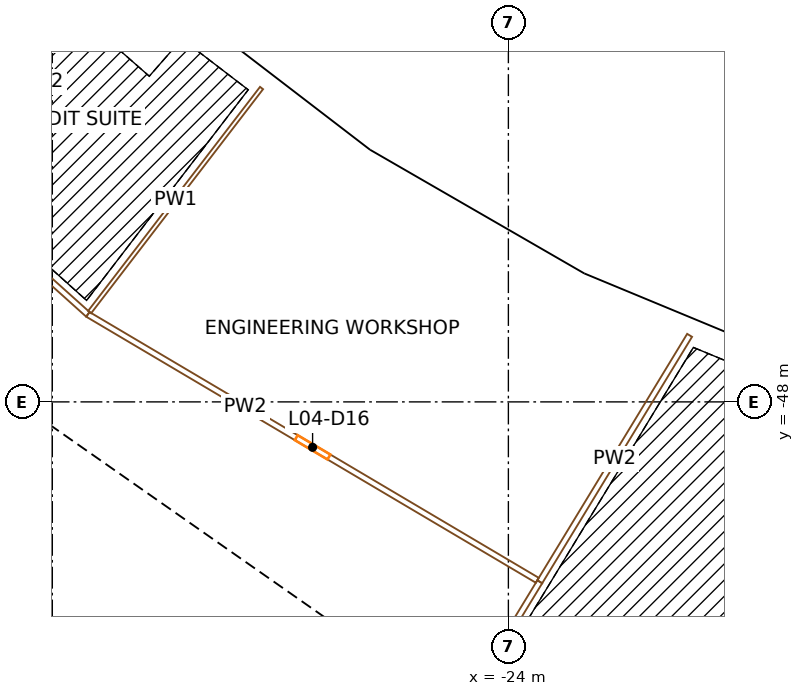
"""IFC4 building model, lengths in metres.
Left out: names, types, materials, properties, quantities, classifications, styles, units other than length and angle.
Written with IfcOpenShell. Run it as: python <this file> out.ifc"""

import sys

from ifc_helpers import new_model, si_unit, direction, frame, frame_2d, origin, origin_2d, place, context, subcontext, project, spatial, rectangle, extrude, element, fill, save


model = new_model("IFC4")
c1 = context("Model", 3, precision=1e-05, world=origin(), true_north=direction((0.0, 1.0)))
c2 = subcontext(c1, "Body", "Model", "MODEL_VIEW")
j1 = project(units=[si_unit("LENGTHUNIT", "METRE"), si_unit("PLANEANGLEUNIT", "RADIAN")], contexts=[c1])
p1 = place(None, origin())
s1 = spatial("IfcSite", under=j1, at=p1, CompositionType="ELEMENT")
p2 = place(p1, origin())
s2 = spatial("IfcBuilding", under=s1, at=p2, CompositionType="ELEMENT")
p3 = place(p2, frame((0.0, 0.0, 31.5)))
s3 = spatial("IfcBuildingStorey", under=s2, at=p3, CompositionType="ELEMENT", Elevation=31.5)
for number, where, z_axis, x_axis in (
    (1, (-33.462, -38.156, 0.0), (0.0, 0.0, 1.0), (0.752, -0.659, 0.0)),
    (2, (-28.195, -42.197, 0.0), (0.0, 0.0, 1.0), (0.831, -0.556, 0.0)),
):
    element("IfcColumn", number, at=place(p3, frame(where, z_axis=z_axis, x_axis=x_axis)), inside=s3, PredefinedType="COLUMN", context=c2, shape_type="SweptSolid", body=[
        extrude(rectangle(XDim=1.1, YDim=1.3, at=origin_2d()), origin(), (0.0, 0.0, 1.0), 4.5),
    ])
p4 = place(p3, frame((-32.362, -48.433, 0.0), z_axis=(0.0, 0.0, 1.0), x_axis=(0.831469612303, -0.55557023302, 0.0)))
e3 = element("IfcColumn", 3, at=p4, inside=s3, PredefinedType="COLUMN", context=c2, shape_type="SweptSolid", body=[
    extrude(rectangle(XDim=1.4, YDim=1.8, at=origin_2d()), origin(), (0.0, 0.0, 1.0), 4.5),
])
p5 = place(p3, frame((-22.446, -45.516, 0.0), z_axis=(0.0, 0.0, 1.0), x_axis=(0.896872741533, -0.442288690219, 0.0)))
e4 = element("IfcColumn", 4, at=p5, inside=s3, PredefinedType="COLUMN", context=c2, shape_type="SweptSolid", body=[
    extrude(rectangle(XDim=1.1, YDim=1.3, at=origin_2d()), origin(), (0.0, 0.0, 1.0), 4.5),
])
p6 = place(p3, frame((-25.763, -52.243, 0.0), z_axis=(0.0, 0.0, 1.0), x_axis=(0.896872741533, -0.442288690219, 0.0)))
e5 = element("IfcColumn", 5, at=p6, inside=s3, PredefinedType="COLUMN", context=c2, shape_type="SweptSolid", body=[
    extrude(rectangle(XDim=1.4, YDim=1.8, at=origin_2d()), origin(), (0.0, 0.0, 1.0), 4.5),
])
p7 = place(p3, frame((-28.854, -54.324, 0.0), z_axis=(0.0, 0.0, 1.0), x_axis=(-0.819145767589, 0.573585400304, 0.0)))
e6 = element("IfcWall", 6, at=p7, inside=s3, PredefinedType="SHEAR", context=c2, shape_type="SweptSolid", body=[
    extrude(rectangle(XDim=15.045, YDim=0.9, at=frame_2d((7.523, 0.0))), origin(), (0.0, 0.0, 1.0), 4.1),
])
p8 = place(p7, frame((1.05, 0.0, 0.0)))
e7 = element("IfcOpeningElement", 7, at=p8, cuts=e6, PredefinedType="OPENING", context=c2, shape_type="SweptSolid", body=[
    extrude(rectangle(XDim=0.9, YDim=2.1, at=frame_2d((0.45, 1.05))), frame((0.0, 0.46, 0.0), z_axis=(0.0, -1.0, 0.0), x_axis=(1.0, 0.0, 0.0)), (0.0, 0.0, 1.0), 0.92),
])
p9 = place(p7, frame((3.775, 0.0, 0.0)))
e8 = element("IfcOpeningElement", 8, at=p9, cuts=e6, PredefinedType="OPENING", context=c2, shape_type="SweptSolid", body=[
    extrude(rectangle(XDim=1.0, YDim=2.1, at=frame_2d((0.5, 1.05))), frame((0.0, 0.46, 0.0), z_axis=(0.0, -1.0, 0.0), x_axis=(1.0, 0.0, 0.0)), (0.0, 0.0, 1.0), 0.92),
])
p10 = place(p7, frame((6.275, 0.0, 0.0)))
e9 = element("IfcOpeningElement", 9, at=p10, cuts=e6, PredefinedType="OPENING", context=c2, shape_type="SweptSolid", body=[
    extrude(rectangle(XDim=1.0, YDim=2.1, at=frame_2d((0.5, 1.05))), frame((0.0, 0.46, 0.0), z_axis=(0.0, -1.0, 0.0), x_axis=(1.0, 0.0, 0.0)), (0.0, 0.0, 1.0), 0.92),
])
p11 = place(p7, frame((13.495, 0.0, 0.0)))
e10 = element("IfcOpeningElement", 10, at=p11, cuts=e6, PredefinedType="OPENING", context=c2, shape_type="SweptSolid", body=[
    extrude(rectangle(XDim=1.1, YDim=2.1, at=frame_2d((0.55, 1.05))), frame((0.0, 0.46, 0.0), z_axis=(0.0, -1.0, 0.0), x_axis=(1.0, 0.0, 0.0)), (0.0, 0.0, 1.0), 0.92),
])
p12 = place(p3, frame((-43.204, -60.696, 0.0), z_axis=(0.0, 0.0, 1.0), x_axis=(0.573571992966, 0.819155155563, 0.0)))
e11 = element("IfcWall", 11, at=p12, inside=s3, PredefinedType="SOLIDWALL", context=c2, shape_type="SweptSolid", body=[
    extrude(rectangle(XDim=13.0, YDim=0.3, at=frame_2d((6.5, 0.0))), origin(), (0.0, 0.0, 1.0), 4.1),
])
p13 = place(p3, frame((-30.461, -56.618, 0.0), z_axis=(0.0, 0.0, 1.0), x_axis=(-0.819142461705, 0.573590121456, 0.0)))
e12 = element("IfcWall", 12, at=p13, inside=s3, PredefinedType="SOLIDWALL", context=c2, shape_type="SweptSolid", body=[
    extrude(rectangle(XDim=7.95, YDim=0.3, at=frame_2d((3.975, 0.0))), origin(), (0.0, 0.0, 1.0), 4.1),
])
p14 = place(p3, frame((-36.191, -55.474, 0.0), z_axis=(0.0, 0.0, 1.0), x_axis=(0.573507030513, 0.819200638399, 0.0)))
e13 = element("IfcWall", 13, at=p14, inside=s3, PredefinedType="SOLIDWALL", context=c2, shape_type="SweptSolid", body=[
    extrude(rectangle(XDim=2.2, YDim=0.3, at=frame_2d((1.1, 0.0))), origin(), (0.0, 0.0, 1.0), 4.1),
])
p15 = place(p3, frame((-32.914, -54.717, 0.0), z_axis=(0.0, 0.0, 1.0), x_axis=(0.573581496053, 0.819148501424, 0.0)))
e14 = element("IfcWall", 14, at=p15, inside=s3, PredefinedType="PARTITIONING", context=c2, shape_type="SweptSolid", body=[
    extrude(rectangle(XDim=2.2, YDim=0.15, at=frame_2d((1.1, 0.0))), origin(), (0.0, 0.0, 1.0), 4.1),
])
p16 = place(p3, frame((-34.88, -53.34, 0.0), z_axis=(0.0, 0.0, 1.0), x_axis=(0.573559170999, 0.819164133348, 0.0)))
e15 = element("IfcWall", 15, at=p16, inside=s3, PredefinedType="PARTITIONING", context=c2, shape_type="SweptSolid", body=[
    extrude(rectangle(XDim=2.2, YDim=0.15, at=frame_2d((1.1, 0.0))), origin(), (0.0, 0.0, 1.0), 4.1),
])
p17 = place(p3, frame((-27.741, -41.571, 0.0), z_axis=(0.0, 0.0, 1.0), x_axis=(-0.793338838284, 0.608780327927, 0.0)))
e16 = element("IfcWall", 16, at=p17, inside=s3, PredefinedType="SOLIDWALL", context=c2, shape_type="SweptSolid", body=[
    extrude(rectangle(XDim=6.597, YDim=0.45, at=frame_2d((3.298, 0.0))), origin(), (0.0, 0.0, 1.0), 3.2),
])
p18 = place(p17, frame((3.749, 0.0, 0.9)))
e17 = element("IfcOpeningElement", 17, at=p18, cuts=e16, PredefinedType="OPENING", context=c2, shape_type="SweptSolid", body=[
    extrude(rectangle(XDim=1.2, YDim=2.15, at=frame_2d((0.6, 1.075))), frame((0.0, 0.235, 0.0), z_axis=(0.0, -1.0, 0.0), x_axis=(1.0, 0.0, 0.0)), (0.0, 0.0, 1.0), 0.47),
])
p19 = place(p17, frame((1.648, 0.0, 0.9)))
e18 = element("IfcOpeningElement", 18, at=p19, cuts=e16, PredefinedType="OPENING", context=c2, shape_type="SweptSolid", body=[
    extrude(rectangle(XDim=1.2, YDim=2.15, at=frame_2d((0.6, 1.075))), frame((0.0, 0.235, 0.0), z_axis=(0.0, -1.0, 0.0), x_axis=(1.0, 0.0, 0.0)), (0.0, 0.0, 1.0), 0.47),
])
p20 = place(p3, frame((-22.155, -44.792, 0.0), z_axis=(0.0, 0.0, 1.0), x_axis=(-0.866022817921, 0.50000447882, 0.0)))
e19 = element("IfcWall", 19, at=p20, inside=s3, PredefinedType="SOLIDWALL", context=c2, shape_type="SweptSolid", body=[
    extrude(rectangle(XDim=6.419, YDim=0.45, at=frame_2d((3.21, 0.0))), origin(), (0.0, 0.0, 1.0), 3.2),
])
p21 = place(p20, frame((3.66, 0.0, 0.9)))
e20 = element("IfcOpeningElement", 20, at=p21, cuts=e19, PredefinedType="OPENING", context=c2, shape_type="SweptSolid", body=[
    extrude(rectangle(XDim=1.2, YDim=2.15, at=frame_2d((0.6, 1.075))), frame((0.0, 0.235, 0.0), z_axis=(0.0, -1.0, 0.0), x_axis=(1.0, 0.0, 0.0)), (0.0, 0.0, 1.0), 0.47),
])
p22 = place(p20, frame((1.56, 0.0, 0.9)))
e21 = element("IfcOpeningElement", 21, at=p22, cuts=e19, PredefinedType="OPENING", context=c2, shape_type="SweptSolid", body=[
    extrude(rectangle(XDim=1.2, YDim=2.15, at=frame_2d((0.6, 1.075))), frame((0.0, 0.235, 0.0), z_axis=(0.0, -1.0, 0.0), x_axis=(1.0, 0.0, 0.0)), (0.0, 0.0, 1.0), 0.47),
])
p23 = place(p3, frame((-16.036, -47.335, 0.0), z_axis=(0.0, 0.0, 1.0), x_axis=(-0.923877459804, 0.382688436284, 0.0)))
e22 = element("IfcWall", 22, at=p23, inside=s3, PredefinedType="SOLIDWALL", context=c2, shape_type="SweptSolid", body=[
    extrude(rectangle(XDim=6.597, YDim=0.45, at=frame_2d((3.299, 0.0))), origin(), (0.0, 0.0, 1.0), 3.2),
])
p24 = place(p23, frame((3.749, 0.0, 0.9)))
e23 = element("IfcOpeningElement", 23, at=p24, cuts=e22, PredefinedType="OPENING", context=c2, shape_type="SweptSolid", body=[
    extrude(rectangle(XDim=1.2, YDim=2.15, at=frame_2d((0.6, 1.075))), frame((0.0, 0.235, 0.0), z_axis=(0.0, -1.0, 0.0), x_axis=(1.0, 0.0, 0.0)), (0.0, 0.0, 1.0), 0.47),
])
p25 = place(p23, frame((1.648, 0.0, 0.9)))
e24 = element("IfcOpeningElement", 24, at=p25, cuts=e22, PredefinedType="OPENING", context=c2, shape_type="SweptSolid", body=[
    extrude(rectangle(XDim=1.2, YDim=2.15, at=frame_2d((0.6, 1.075))), frame((0.0, 0.235, 0.0), z_axis=(0.0, -1.0, 0.0), x_axis=(1.0, 0.0, 0.0)), (0.0, 0.0, 1.0), 0.47),
])
p26 = place(p3, frame((-41.592, -39.839, 0.0), z_axis=(0.0, 0.0, 1.0), x_axis=(0.744252572607, -0.667898276812, 0.0)))
e25 = element("IfcWall", 25, at=p26, inside=s3, PredefinedType="PARTITIONING", context=c2, shape_type="SweptSolid", body=[
    extrude(rectangle(XDim=8.771, YDim=0.15, at=frame_2d((4.385, 0.0))), origin(), (0.0, 0.0, 1.0), 3.1),
])
p27 = place(p26, frame((2.685, 0.0, 0.0)))
e26 = element("IfcOpeningElement", 26, at=p27, cuts=e25, PredefinedType="OPENING", context=c2, shape_type="SweptSolid", body=[
    extrude(rectangle(XDim=1.0, YDim=2.1, at=frame_2d((0.5, 1.05))), frame((0.0, 0.085, 0.0), z_axis=(0.0, -1.0, 0.0), x_axis=(1.0, 0.0, 0.0)), (0.0, 0.0, 1.0), 0.17),
])
p28 = place(p3, frame((-35.065, -45.697, 0.0), z_axis=(0.0, 0.0, 1.0), x_axis=(0.860638818745, -0.509215891022, 0.0)))
e27 = element("IfcWall", 27, at=p28, inside=s3, PredefinedType="PARTITIONING", context=c2, shape_type="SweptSolid", body=[
    extrude(rectangle(XDim=13.741, YDim=0.15, at=frame_2d((6.871, 0.0))), origin(), (0.0, 0.0, 1.0), 3.1),
])
p29 = place(p28, frame((6.37, 0.0, 0.0)))
e28 = element("IfcOpeningElement", 28, at=p29, cuts=e27, PredefinedType="OPENING", context=c2, shape_type="SweptSolid", body=[
    extrude(rectangle(XDim=1.0, YDim=2.1, at=frame_2d((0.5, 1.05))), frame((0.0, 0.085, 0.0), z_axis=(0.0, -1.0, 0.0), x_axis=(1.0, 0.0, 0.0)), (0.0, 0.0, 1.0), 0.17),
])
p30 = place(p3, frame((-30.495, -39.742, 0.0), z_axis=(0.0, 0.0, 1.0), x_axis=(-0.60877839598, -0.793340320788, 0.0)))
e29 = element("IfcWall", 29, at=p30, inside=s3, PredefinedType="PARTITIONING", context=c2, shape_type="SweptSolid", body=[
    extrude(rectangle(XDim=7.432, YDim=0.1, at=frame_2d((3.716, 0.0))), origin(), (0.0, 0.0, 1.0), 3.1),
])
p31 = place(p3, frame((-23.174, -52.732, 0.0), z_axis=(0.0, 0.0, 1.0), x_axis=(-0.519577254173, -0.854423476355, 0.0)))
e30 = element("IfcWall", 30, at=p31, inside=s3, PredefinedType="PARTITIONING", context=c2, shape_type="SweptSolid", body=[
    extrude(rectangle(XDim=9.345, YDim=0.15, at=frame_2d((4.672, 0.0))), origin(), (0.0, 0.0, 1.0), 3.1),
])
p32 = place(p3, frame((-19.231, -46.249, 0.0), z_axis=(0.0, 0.0, 1.0), x_axis=(-0.519582509181, -0.854420280748, 0.0)))
e31 = element("IfcWall", 31, at=p32, inside=s3, PredefinedType="PARTITIONING", context=c2, shape_type="SweptSolid", body=[
    extrude(rectangle(XDim=7.588, YDim=0.15, at=frame_2d((3.794, 0.0))), origin(), (0.0, 0.0, 1.0), 3.1),
])
p33 = place(p8, origin())
e32 = element("IfcDoor", 32, at=p33, inside=s3, OperationType="SINGLE_SWING_LEFT", PredefinedType="DOOR", context=c2, shape_type="SweptSolid", body=[
    extrude(rectangle(XDim=0.9, YDim=2.1, at=frame_2d((0.45, 1.05))), frame((0.0, 0.025, 0.0), z_axis=(0.0, -1.0, 0.0), x_axis=(1.0, 0.0, 0.0)), (0.0, 0.0, 1.0), 0.05),
])
fill(e7, e32)
p34 = place(p9, origin())
e33 = element("IfcDoor", 33, at=p34, inside=s3, OperationType="SINGLE_SWING_RIGHT", PredefinedType="DOOR", context=c2, shape_type="SweptSolid", body=[
    extrude(rectangle(XDim=1.0, YDim=2.1, at=frame_2d((0.5, 1.05))), frame((0.0, 0.025, 0.0), z_axis=(0.0, -1.0, 0.0), x_axis=(1.0, 0.0, 0.0)), (0.0, 0.0, 1.0), 0.05),
])
fill(e8, e33)
p35 = place(p10, origin())
e34 = element("IfcDoor", 34, at=p35, inside=s3, OperationType="SINGLE_SWING_LEFT", PredefinedType="DOOR", context=c2, shape_type="SweptSolid", body=[
    extrude(rectangle(XDim=1.0, YDim=2.1, at=frame_2d((0.5, 1.05))), frame((0.0, 0.025, 0.0), z_axis=(0.0, -1.0, 0.0), x_axis=(1.0, 0.0, 0.0)), (0.0, 0.0, 1.0), 0.05),
])
fill(e9, e34)
p36 = place(p18, origin())
e35 = element("IfcWindow", 35, at=p36, inside=s3, PartitioningType="SINGLE_PANEL", PredefinedType="WINDOW", context=c2, shape_type="SweptSolid", body=[
    extrude(rectangle(XDim=1.2, YDim=2.15, at=frame_2d((0.6, 1.075))), frame((0.0, 0.03, 0.0), z_axis=(0.0, -1.0, 0.0), x_axis=(1.0, 0.0, 0.0)), (0.0, 0.0, 1.0), 0.06),
])
fill(e17, e35)
p37 = place(p19, origin())
e36 = element("IfcWindow", 36, at=p37, inside=s3, PartitioningType="SINGLE_PANEL", PredefinedType="WINDOW", context=c2, shape_type="SweptSolid", body=[
    extrude(rectangle(XDim=1.2, YDim=2.15, at=frame_2d((0.6, 1.075))), frame((0.0, 0.03, 0.0), z_axis=(0.0, -1.0, 0.0), x_axis=(1.0, 0.0, 0.0)), (0.0, 0.0, 1.0), 0.06),
])
fill(e18, e36)
p38 = place(p21, origin())
e37 = element("IfcWindow", 37, at=p38, inside=s3, PartitioningType="SINGLE_PANEL", PredefinedType="WINDOW", context=c2, shape_type="SweptSolid", body=[
    extrude(rectangle(XDim=1.2, YDim=2.15, at=frame_2d((0.6, 1.075))), frame((0.0, 0.03, 0.0), z_axis=(0.0, -1.0, 0.0), x_axis=(1.0, 0.0, 0.0)), (0.0, 0.0, 1.0), 0.06),
])
fill(e20, e37)
p39 = place(p22, origin())
e38 = element("IfcWindow", 38, at=p39, inside=s3, PartitioningType="SINGLE_PANEL", PredefinedType="WINDOW", context=c2, shape_type="SweptSolid", body=[
    extrude(rectangle(XDim=1.2, YDim=2.15, at=frame_2d((0.6, 1.075))), frame((0.0, 0.03, 0.0), z_axis=(0.0, -1.0, 0.0), x_axis=(1.0, 0.0, 0.0)), (0.0, 0.0, 1.0), 0.06),
])
fill(e21, e38)
p40 = place(p24, origin())
e39 = element("IfcWindow", 39, at=p40, inside=s3, PartitioningType="SINGLE_PANEL", PredefinedType="WINDOW", context=c2, shape_type="SweptSolid", body=[
    extrude(rectangle(XDim=1.2, YDim=2.15, at=frame_2d((0.6, 1.075))), frame((0.0, 0.03, 0.0), z_axis=(0.0, -1.0, 0.0), x_axis=(1.0, 0.0, 0.0)), (0.0, 0.0, 1.0), 0.06),
])
fill(e23, e39)
p41 = place(p25, origin())
e40 = element("IfcWindow", 40, at=p41, inside=s3, PartitioningType="SINGLE_PANEL", PredefinedType="WINDOW", context=c2, shape_type="SweptSolid", body=[
    extrude(rectangle(XDim=1.2, YDim=2.15, at=frame_2d((0.6, 1.075))), frame((0.0, 0.03, 0.0), z_axis=(0.0, -1.0, 0.0), x_axis=(1.0, 0.0, 0.0)), (0.0, 0.0, 1.0), 0.06),
])
fill(e24, e40)
p42 = place(p29, origin())
e41 = element("IfcDoor", 41, at=p42, inside=s3, OperationType="SINGLE_SWING_RIGHT", PredefinedType="DOOR", context=c2, shape_type="SweptSolid", body=[
    extrude(rectangle(XDim=1.0, YDim=2.1, at=frame_2d((0.5, 1.05))), frame((0.0, 0.025, 0.0), z_axis=(0.0, -1.0, 0.0), x_axis=(1.0, 0.0, 0.0)), (0.0, 0.0, 1.0), 0.05),
])
fill(e28, e41)
save(model, sys.argv[1])
